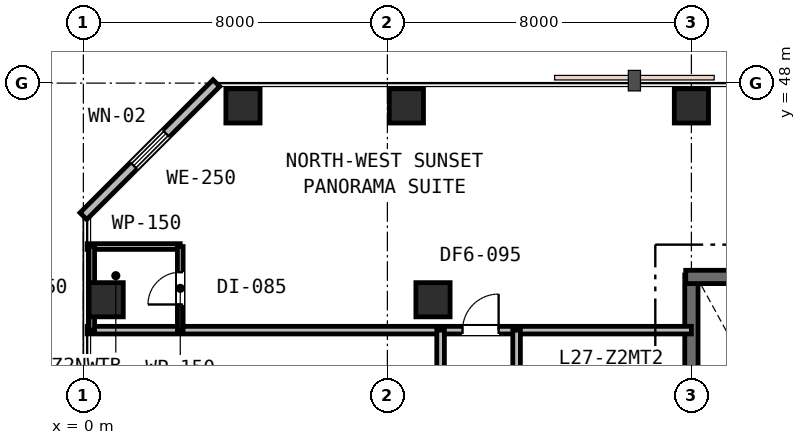
"""IFC4 building model, lengths in metres.
Left out: names, types, materials, properties, quantities, classifications, styles, units other than length and angle.
Written with IfcOpenShell. Run it as: python <this file> out.ifc"""

import sys

from ifc_helpers import new_model, si_unit, direction, frame, frame_2d, origin, origin_2d, place, context, subcontext, project, spatial, rectangle, extrude, element, fill, save


model = new_model("IFC4")
c1 = context("Model", 3, precision=1e-05, world=origin(), true_north=direction((0.0, 1.0)))
c2 = subcontext(c1, "Body", "Model", "MODEL_VIEW")
j1 = project(units=[si_unit("LENGTHUNIT", "METRE"), si_unit("PLANEANGLEUNIT", "RADIAN")], contexts=[c1])
p1 = place(None, origin())
s1 = spatial("IfcSite", under=j1, at=p1, CompositionType="ELEMENT")
p2 = place(p1, origin())
s2 = spatial("IfcBuilding", under=s1, at=p2, CompositionType="ELEMENT")
p3 = place(p2, frame((0.0, 0.0, 108.0)))
s3 = spatial("IfcBuildingStorey", under=s2, at=p3, CompositionType="ELEMENT", Elevation=108.0)
p4 = place(p3, frame((16.0, 30.65, 0.0), z_axis=(0.0, 0.0, 1.0), x_axis=(0.0, 1.0, 0.0)))
e1 = element("IfcWall", 1, at=p4, inside=s3, PredefinedType="SHEAR", context=c2, shape_type="SweptSolid", body=[
    extrude(rectangle(XDim=12.3, YDim=0.35, at=frame_2d((6.15, 0.0))), origin(), (0.0, 0.0, 1.0), 3.6),
])
p5 = place(p3, frame((15.85, 42.9, 0.0), z_axis=(0.0, 0.0, 1.0), x_axis=(1.0, 0.0, 0.0)))
e2 = element("IfcWall", 2, at=p5, inside=s3, PredefinedType="SHEAR", context=c2, shape_type="SweptSolid", body=[
    extrude(rectangle(XDim=24.3, YDim=0.35, at=frame_2d((12.15, 0.0))), origin(), (0.0, 0.0, 1.0), 3.6),
])
for number, where, z_axis, x_axis in (
    (3, (9.2, 42.3, 0.0), (0.0, 0.0, 1.0), (1.0, 0.0, 0.0)),
    (4, (0.6, 42.3, 0.0), (0.0, 0.0, 1.0), (1.0, 0.0, 0.0)),
    (5, (4.2, 47.4, 0.0), (0.0, 0.0, 1.0), (1.0, 0.0, 0.0)),
    (6, (8.5, 47.4, 0.0), (0.0, 0.0, 1.0), (1.0, 0.0, 0.0)),
    (7, (16.0, 47.4, 0.0), (0.0, 0.0, 1.0), (1.0, 0.0, 0.0)),
):
    element("IfcColumn", number, at=place(p3, frame(where, z_axis=z_axis, x_axis=x_axis)), inside=s3, PredefinedType="COLUMN", context=c2, shape_type="SweptSolid", body=[
        extrude(rectangle(XDim=0.9, YDim=0.9, at=origin_2d()), origin(), (0.0, 0.0, 1.0), 3.6),
    ])
p6 = place(p3, frame((3.5, 48.0, 0.0), z_axis=(0.0, 0.0, 1.0), x_axis=(-0.707106781187, -0.707106781187, 0.0)))
e8 = element("IfcWall", 8, at=p6, inside=s3, PredefinedType="STANDARD", context=c2, shape_type="SweptSolid", body=[
    extrude(rectangle(XDim=4.95, YDim=0.25, at=frame_2d((2.475, 0.0))), origin(), (0.0, 0.0, 1.0), 3.33),
])
p7 = place(p6, frame((1.875, 0.0, 0.85)))
e9 = element("IfcOpeningElement", 9, at=p7, cuts=e8, PredefinedType="OPENING", context=c2, shape_type="SweptSolid", body=[
    extrude(rectangle(XDim=1.2, YDim=1.6, at=frame_2d((0.6, 0.8))), frame((0.0, 0.135, 0.0), z_axis=(0.0, -1.0, 0.0), x_axis=(1.0, 0.0, 0.0)), (0.0, 0.0, 1.0), 0.27),
])
p8 = place(p3, frame((0.1, 41.5, 0.0), z_axis=(0.0, 0.0, 1.0), x_axis=(1.0, 0.0, 0.0)))
e10 = element("IfcWall", 10, at=p8, inside=s3, PredefinedType="PARTITIONING", context=c2, shape_type="SweptSolid", body=[
    extrude(rectangle(XDim=15.9, YDim=0.2, at=frame_2d((7.95, 0.0))), origin(), (0.0, 0.0, 1.0), 2.87),
])
p9 = place(p8, frame((9.877, 0.0, 0.0)))
e11 = element("IfcOpeningElement", 11, at=p9, cuts=e10, PredefinedType="OPENING", context=c2, shape_type="SweptSolid", body=[
    extrude(rectangle(XDim=0.95, YDim=2.15, at=frame_2d((0.475, 1.075))), frame((0.0, 0.11, 0.0), z_axis=(0.0, -1.0, 0.0), x_axis=(1.0, 0.0, 0.0)), (0.0, 0.0, 1.0), 0.22),
])
p10 = place(p3, frame((0.1, 43.7, 0.0), z_axis=(0.0, 0.0, 1.0), x_axis=(1.0, 0.0, 0.0)))
e12 = element("IfcWall", 12, at=p10, inside=s3, PredefinedType="PARTITIONING", context=c2, shape_type="SweptSolid", body=[
    extrude(rectangle(XDim=2.45, YDim=0.15, at=frame_2d((1.225, 0.0))), origin(), (0.0, 0.0, 1.0), 3.33),
])
p11 = place(p3, frame((2.55, 41.5, 0.0), z_axis=(0.0, 0.0, 1.0), x_axis=(0.0, 1.0, 0.0)))
e13 = element("IfcWall", 13, at=p11, inside=s3, PredefinedType="PARTITIONING", context=c2, shape_type="SweptSolid", body=[
    extrude(rectangle(XDim=2.2, YDim=0.15, at=frame_2d((1.1, 0.0))), origin(), (0.0, 0.0, 1.0), 2.87),
])
p12 = place(p11, frame((0.675, 0.0, 0.0)))
e14 = element("IfcOpeningElement", 14, at=p12, cuts=e13, PredefinedType="OPENING", context=c2, shape_type="SweptSolid", body=[
    extrude(rectangle(XDim=0.85, YDim=2.15, at=frame_2d((0.425, 1.075))), frame((0.0, 0.085, 0.0), z_axis=(0.0, -1.0, 0.0), x_axis=(1.0, 0.0, 0.0)), (0.0, 0.0, 1.0), 0.17),
])
p13 = place(p3, frame((0.22, 41.5, 0.0), z_axis=(0.0, 0.0, 1.0), x_axis=(0.0, 1.0, 0.0)))
e15 = element("IfcWall", 15, at=p13, inside=s3, PredefinedType="PARTITIONING", context=c2, shape_type="SweptSolid", body=[
    extrude(rectangle(XDim=2.2, YDim=0.15, at=frame_2d((1.1, 0.0))), origin(), (0.0, 0.0, 1.0), 2.87),
])
p14 = place(p3, frame((9.4, 28.6, 0.0), z_axis=(0.0, 0.0, 1.0), x_axis=(0.0, 1.0, 0.0)))
e16 = element("IfcWall", 16, at=p14, inside=s3, PredefinedType="PARTITIONING", context=c2, shape_type="SweptSolid", body=[
    extrude(rectangle(XDim=12.9, YDim=0.2, at=frame_2d((6.45, 0.0))), origin(), (0.0, 0.0, 1.0), 2.87),
])
p15 = place(p14, frame((3.825, 0.0, 0.0)))
e17 = element("IfcOpeningElement", 17, at=p15, cuts=e16, PredefinedType="OPENING", context=c2, shape_type="SweptSolid", body=[
    extrude(rectangle(XDim=0.95, YDim=2.15, at=frame_2d((0.475, 1.075))), frame((0.0, 0.11, 0.0), z_axis=(0.0, -1.0, 0.0), x_axis=(1.0, 0.0, 0.0)), (0.0, 0.0, 1.0), 0.22),
])
p16 = place(p14, frame((9.175, 0.0, 0.0)))
e18 = element("IfcOpeningElement", 18, at=p16, cuts=e16, PredefinedType="OPENING", context=c2, shape_type="SweptSolid", body=[
    extrude(rectangle(XDim=0.95, YDim=2.15, at=frame_2d((0.475, 1.075))), frame((0.0, 0.11, 0.0), z_axis=(0.0, -1.0, 0.0), x_axis=(1.0, 0.0, 0.0)), (0.0, 0.0, 1.0), 0.22),
])
p17 = place(p3, frame((11.4, 30.8, 0.0), z_axis=(0.0, 0.0, 1.0), x_axis=(0.0, 1.0, 0.0)))
e19 = element("IfcWall", 19, at=p17, inside=s3, PredefinedType="PARTITIONING", context=c2, shape_type="SweptSolid", body=[
    extrude(rectangle(XDim=10.7, YDim=0.2, at=frame_2d((5.35, 0.0))), origin(), (0.0, 0.0, 1.0), 2.87),
])
p18 = place(p17, frame((2.225, 0.0, 0.0)))
e20 = element("IfcOpeningElement", 20, at=p18, cuts=e19, PredefinedType="OPENING", context=c2, shape_type="SweptSolid", body=[
    extrude(rectangle(XDim=0.95, YDim=2.15, at=frame_2d((0.475, 1.075))), frame((0.0, 0.11, 0.0), z_axis=(0.0, -1.0, 0.0), x_axis=(1.0, 0.0, 0.0)), (0.0, 0.0, 1.0), 0.22),
])
p19 = place(p17, frame((7.575, 0.0, 0.0)))
e21 = element("IfcOpeningElement", 21, at=p19, cuts=e19, PredefinedType="OPENING", context=c2, shape_type="SweptSolid", body=[
    extrude(rectangle(XDim=0.95, YDim=2.15, at=frame_2d((0.475, 1.075))), frame((0.0, 0.11, 0.0), z_axis=(0.0, -1.0, 0.0), x_axis=(1.0, 0.0, 0.0)), (0.0, 0.0, 1.0), 0.22),
])
p20 = place(p7, origin())
e22 = element("IfcWindow", 22, at=p20, inside=s3, PartitioningType="SINGLE_PANEL", PredefinedType="WINDOW", context=c2, shape_type="SweptSolid", body=[
    extrude(rectangle(XDim=1.2, YDim=1.6, at=frame_2d((0.6, 0.8))), frame((0.0, 0.03, 0.0), z_axis=(0.0, -1.0, 0.0), x_axis=(1.0, 0.0, 0.0)), (0.0, 0.0, 1.0), 0.06),
])
fill(e9, e22)
p21 = place(p9, origin())
e23 = element("IfcDoor", 23, at=p21, inside=s3, OperationType="SINGLE_SWING_RIGHT", PredefinedType="DOOR", context=c2, shape_type="SweptSolid", body=[
    extrude(rectangle(XDim=0.95, YDim=2.15, at=frame_2d((0.475, 1.075))), frame((0.0, 0.025, 0.0), z_axis=(0.0, -1.0, 0.0), x_axis=(1.0, 0.0, 0.0)), (0.0, 0.0, 1.0), 0.05),
])
fill(e11, e23)
p22 = place(p12, origin())
e24 = element("IfcDoor", 24, at=p22, inside=s3, OperationType="SINGLE_SWING_LEFT", PredefinedType="DOOR", context=c2, shape_type="SweptSolid", body=[
    extrude(rectangle(XDim=0.85, YDim=2.15, at=frame_2d((0.425, 1.075))), frame((0.0, 0.025, 0.0), z_axis=(0.0, -1.0, 0.0), x_axis=(1.0, 0.0, 0.0)), (0.0, 0.0, 1.0), 0.05),
])
fill(e14, e24)
save(model, sys.argv[1])
